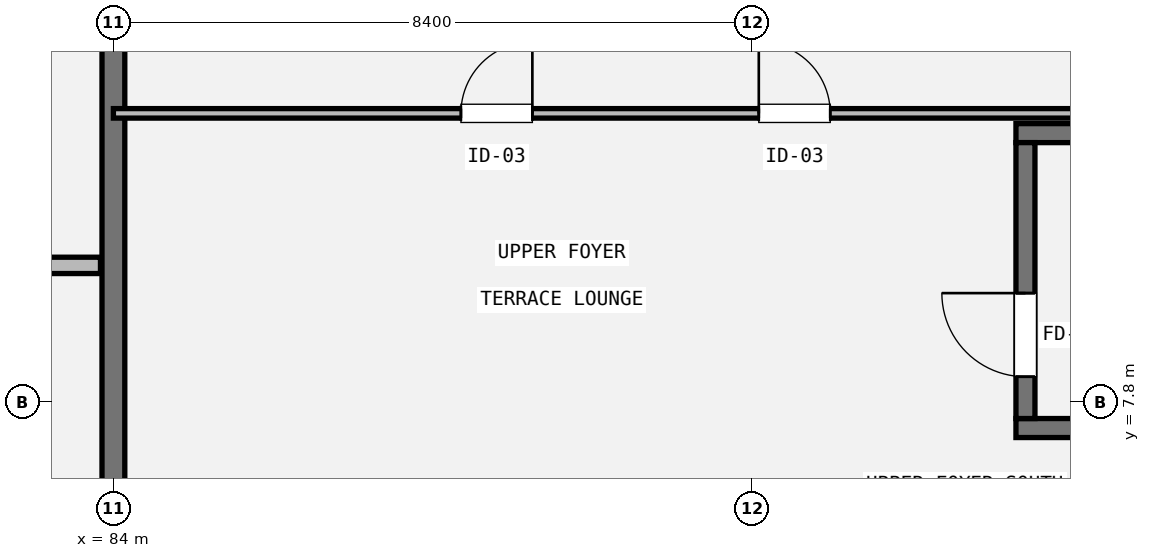
"""IFC4 building model, lengths in metres.
Left out: names, types, materials, properties, quantities, classifications, styles, units other than length and angle.
Written with IfcOpenShell. Run it as: python <this file> out.ifc"""

import sys

from ifc_helpers import new_model, si_unit, direction, frame, frame_2d, origin, place, context, subcontext, project, spatial, rectangle, extrude, element, fill, save


model = new_model("IFC4")
c1 = context("Model", 3, precision=1e-05, world=origin(), true_north=direction((0.0, 1.0)))
c2 = subcontext(c1, "Body", "Model", "MODEL_VIEW")
j1 = project(units=[si_unit("LENGTHUNIT", "METRE"), si_unit("PLANEANGLEUNIT", "RADIAN")], contexts=[c1])
p1 = place(None, origin())
s1 = spatial("IfcSite", under=j1, at=p1, CompositionType="ELEMENT")
p2 = place(p1, origin())
s2 = spatial("IfcBuilding", under=s1, at=p2, CompositionType="ELEMENT")
p3 = place(p2, frame((0.0, 0.0, 10.2)))
s3 = spatial("IfcBuildingStorey", under=s2, at=p3, CompositionType="ELEMENT", Elevation=10.2)
for number, where, z_axis, x_axis in (
    (1, (106.285, 7.46, 0.0), (0.0, 0.0, 1.0), (-1.0, 0.0, 0.0)),
    (2, (95.875, 11.34, 0.0), (0.0, 0.0, 1.0), (1.0, 0.0, 0.0)),
):
    element("IfcWall", number, at=place(p3, frame(where, z_axis=z_axis, x_axis=x_axis)), inside=s3, PredefinedType="SHEAR", context=c2, shape_type="SweptSolid", body=[
        extrude(rectangle(XDim=10.41, YDim=0.25, at=frame_2d((5.205, 0.0))), origin(), (0.0, 0.0, 1.0), 4.6),
    ])
p4 = place(p3, frame((96.0, 7.585, 0.0), z_axis=(0.0, 0.0, 1.0), x_axis=(0.0, 1.0, 0.0)))
e3 = element("IfcWall", 3, at=p4, inside=s3, PredefinedType="SHEAR", context=c2, shape_type="SweptSolid", body=[
    extrude(rectangle(XDim=3.63, YDim=0.25, at=frame_2d((1.815, 0.0))), origin(), (0.0, 0.0, 1.0), 4.6),
])
p5 = place(p4, frame((0.55, 0.0, 0.0)))
e4 = element("IfcOpeningElement", 4, at=p5, cuts=e3, PredefinedType="OPENING", context=c2, shape_type="SweptSolid", body=[
    extrude(rectangle(XDim=1.1, YDim=2.15, at=frame_2d((0.55, 1.075))), frame((0.0, 0.135, 0.0), z_axis=(0.0, -1.0, 0.0), x_axis=(1.0, 0.0, 0.0)), (0.0, 0.0, 1.0), 0.27),
])
p6 = place(p3, frame((84.0, 16.65, 0.0), z_axis=(0.0, 0.0, 1.0), x_axis=(0.0, -1.0, 0.0)))
e5 = element("IfcWall", 5, at=p6, inside=s3, PredefinedType="SHEAR", context=c2, shape_type="SweptSolid", body=[
    extrude(rectangle(XDim=10.3, YDim=0.3, at=frame_2d((5.15, 0.0))), origin(), (0.0, 0.0, 1.0), 4.6),
])
p7 = place(p6, frame((0.975, 0.0, 0.0)))
e6 = element("IfcOpeningElement", 6, at=p7, cuts=e5, PredefinedType="OPENING", context=c2, shape_type="SweptSolid", body=[
    extrude(rectangle(XDim=1.35, YDim=2.15, at=frame_2d((0.675, 1.075))), frame((0.0, 0.16, 0.0), z_axis=(0.0, -1.0, 0.0), x_axis=(1.0, 0.0, 0.0)), (0.0, 0.0, 1.0), 0.32),
])
p8 = place(p3, frame((79.98, 9.6, 0.0), z_axis=(0.0, 0.0, 1.0), x_axis=(1.0, 0.0, 0.0)))
e7 = element("IfcWall", 7, at=p8, inside=s3, PredefinedType="STANDARD", context=c2, shape_type="SweptSolid", body=[
    extrude(rectangle(XDim=3.85, YDim=0.215, at=frame_2d((1.925, 0.0))), origin(), (0.0, 0.0, 1.0), 3.95),
])
p9 = place(p8, frame((1.4, 0.0, 0.0)))
e8 = element("IfcOpeningElement", 8, at=p9, cuts=e7, PredefinedType="OPENING", context=c2, shape_type="SweptSolid", body=[
    extrude(rectangle(XDim=1.05, YDim=2.15, at=frame_2d((0.525, 1.075))), frame((0.0, 0.117, 0.0), z_axis=(0.0, -1.0, 0.0), x_axis=(1.0, 0.0, 0.0)), (0.0, 0.0, 1.0), 0.235),
])
p10 = place(p3, frame((84.0, 11.6, 0.0), z_axis=(0.0, 0.0, 1.0), x_axis=(1.0, 0.0, 0.0)))
e9 = element("IfcWall", 9, at=p10, inside=s3, PredefinedType="PARTITIONING", context=c2, shape_type="SweptSolid", body=[
    extrude(rectangle(XDim=33.6, YDim=0.125, at=frame_2d((16.8, 0.0))), origin(), (0.0, 0.0, 1.0), 3.95),
])
p11 = place(p10, frame((4.573, 0.0, 0.0)))
e10 = element("IfcOpeningElement", 10, at=p11, cuts=e9, PredefinedType="OPENING", context=c2, shape_type="SweptSolid", body=[
    extrude(rectangle(XDim=0.94, YDim=2.1, at=frame_2d((0.47, 1.05))), frame((0.0, 0.073, 0.0), z_axis=(0.0, -1.0, 0.0), x_axis=(1.0, 0.0, 0.0)), (0.0, 0.0, 1.0), 0.145),
])
p12 = place(p10, frame((8.492, 0.0, 0.0)))
e11 = element("IfcOpeningElement", 11, at=p12, cuts=e9, PredefinedType="OPENING", context=c2, shape_type="SweptSolid", body=[
    extrude(rectangle(XDim=0.94, YDim=2.1, at=frame_2d((0.47, 1.05))), frame((0.0, 0.073, 0.0), z_axis=(0.0, -1.0, 0.0), x_axis=(1.0, 0.0, 0.0)), (0.0, 0.0, 1.0), 0.145),
])
p13 = place(p10, frame((27.761, 0.0, 0.0)))
e12 = element("IfcOpeningElement", 12, at=p13, cuts=e9, PredefinedType="OPENING", context=c2, shape_type="SweptSolid", body=[
    extrude(rectangle(XDim=0.94, YDim=2.1, at=frame_2d((0.47, 1.05))), frame((0.0, 0.073, 0.0), z_axis=(0.0, -1.0, 0.0), x_axis=(1.0, 0.0, 0.0)), (0.0, 0.0, 1.0), 0.145),
])
p14 = place(p5, origin())
e13 = element("IfcDoor", 13, at=p14, inside=s3, OperationType="SINGLE_SWING_RIGHT", PredefinedType="DOOR", context=c2, shape_type="SweptSolid", body=[
    extrude(rectangle(XDim=1.1, YDim=2.15, at=frame_2d((0.55, 1.075))), frame((0.0, 0.025, 0.0), z_axis=(0.0, -1.0, 0.0), x_axis=(1.0, 0.0, 0.0)), (0.0, 0.0, 1.0), 0.05),
])
fill(e4, e13)
p15 = place(p11, origin())
e14 = element("IfcDoor", 14, at=p15, inside=s3, OperationType="SINGLE_SWING_RIGHT", PredefinedType="DOOR", context=c2, shape_type="SweptSolid", body=[
    extrude(rectangle(XDim=0.94, YDim=2.1, at=frame_2d((0.47, 1.05))), frame((0.0, 0.025, 0.0), z_axis=(0.0, -1.0, 0.0), x_axis=(1.0, 0.0, 0.0)), (0.0, 0.0, 1.0), 0.05),
])
fill(e10, e14)
p16 = place(p12, origin())
e15 = element("IfcDoor", 15, at=p16, inside=s3, OperationType="SINGLE_SWING_LEFT", PredefinedType="DOOR", context=c2, shape_type="SweptSolid", body=[
    extrude(rectangle(XDim=0.94, YDim=2.1, at=frame_2d((0.47, 1.05))), frame((0.0, 0.025, 0.0), z_axis=(0.0, -1.0, 0.0), x_axis=(1.0, 0.0, 0.0)), (0.0, 0.0, 1.0), 0.05),
])
fill(e11, e15)
save(model, sys.argv[1])
